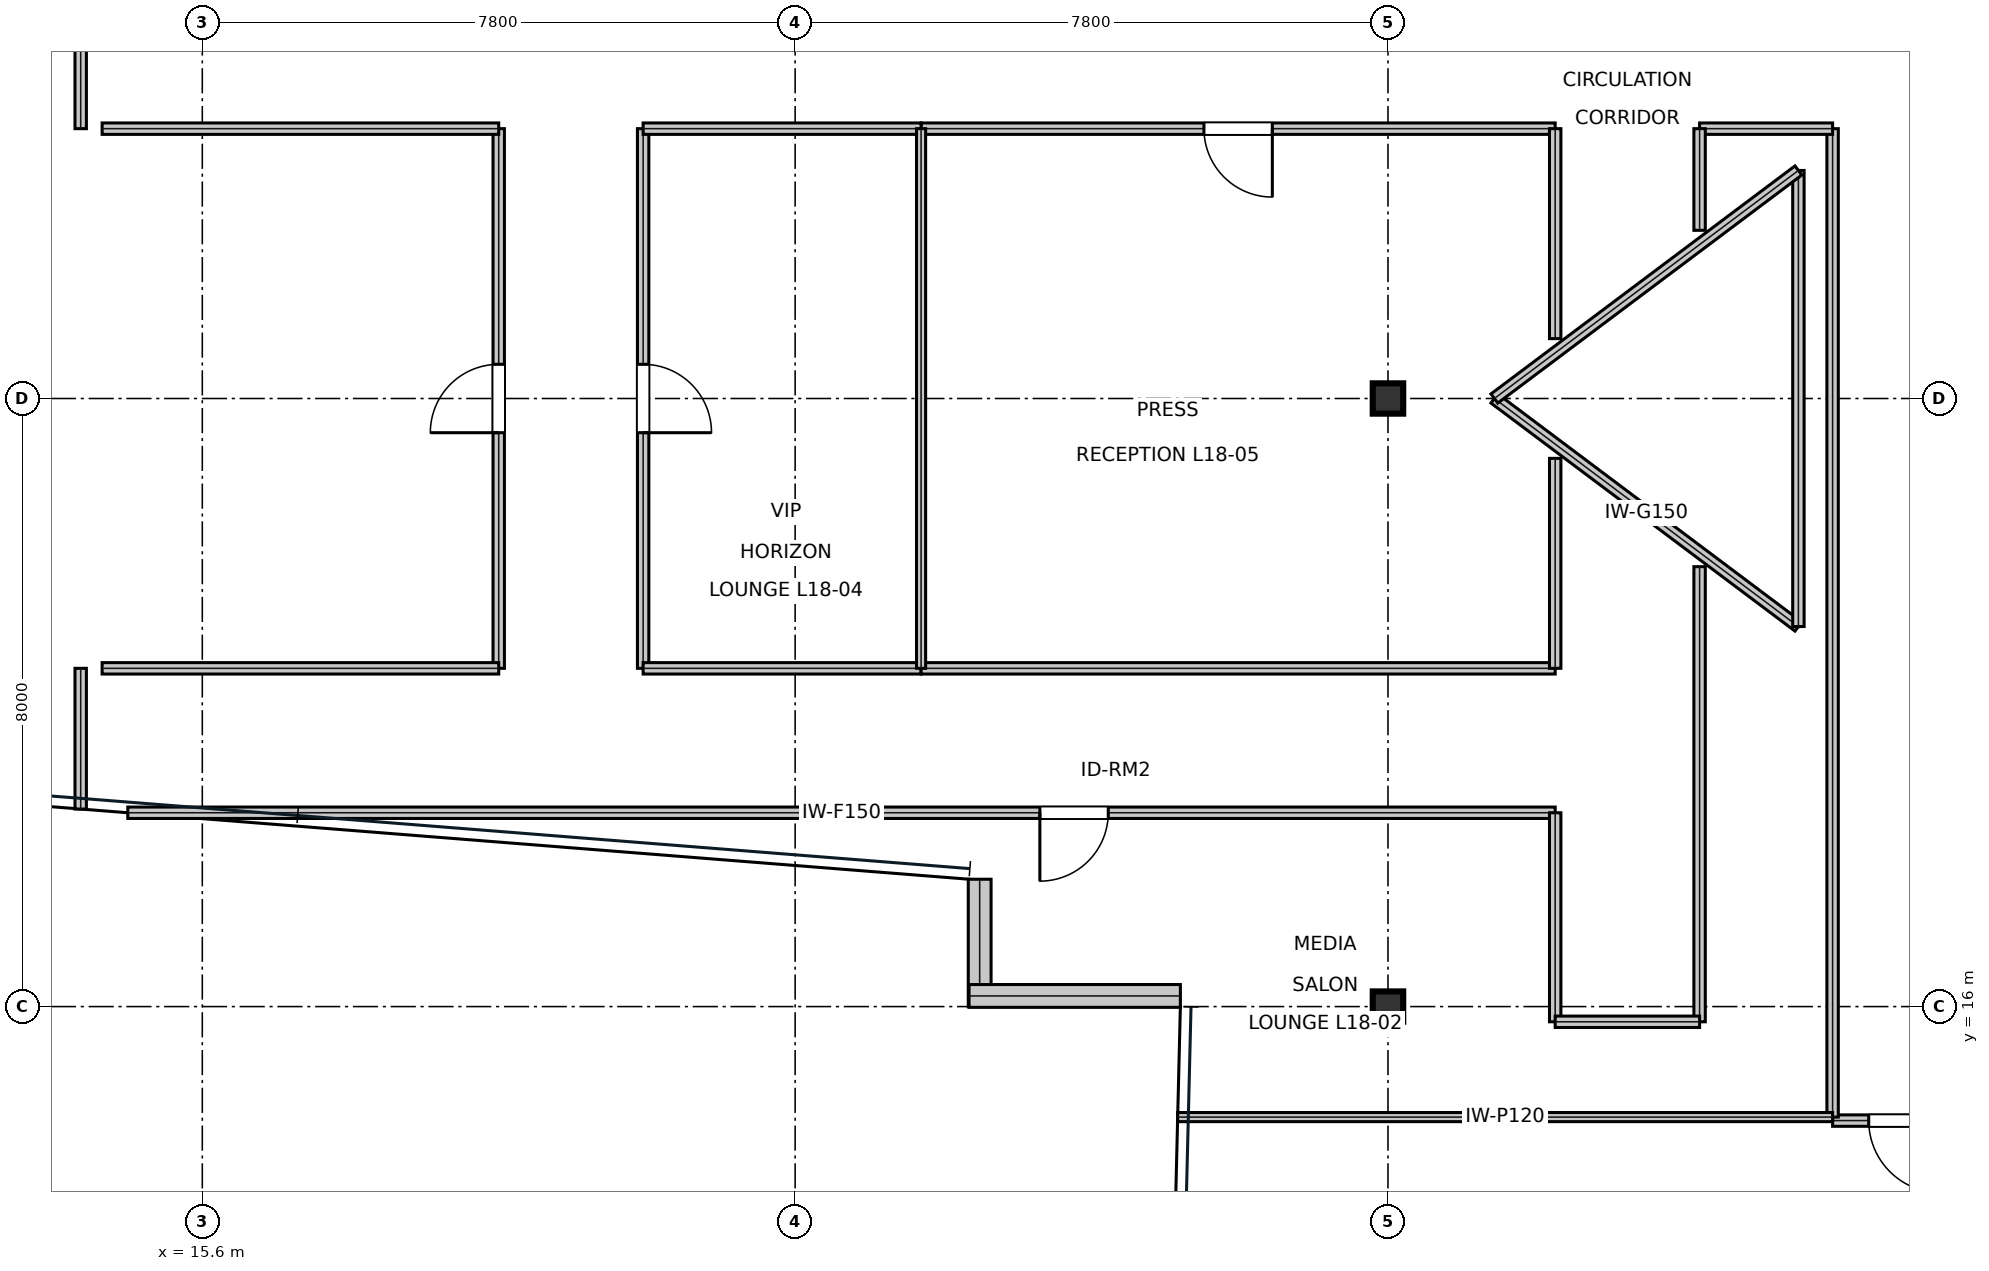
"""IFC4 building model, lengths in metres.
Left out: names, types, materials, properties, quantities, classifications, styles, units other than length and angle.
Written with IfcOpenShell. Run it as: python <this file> out.ifc"""

import sys

from ifc_helpers import new_model, si_unit, direction, frame, frame_2d, origin, origin_2d, place, context, subcontext, project, spatial, rectangle, i_section, extrude, element, fill, save


model = new_model("IFC4")
c1 = context("Model", 3, precision=1e-05, world=origin(), true_north=direction((0.0, 1.0)))
c2 = subcontext(c1, "Body", "Model", "MODEL_VIEW")
j1 = project(units=[si_unit("LENGTHUNIT", "METRE"), si_unit("PLANEANGLEUNIT", "RADIAN")], contexts=[c1])
p1 = place(None, origin())
s1 = spatial("IfcSite", under=j1, at=p1, CompositionType="ELEMENT")
p2 = place(p1, origin())
s2 = spatial("IfcBuilding", under=s1, at=p2, CompositionType="ELEMENT")
p3 = place(p2, frame((0.0, 0.0, 82.35)))
s3 = spatial("IfcBuildingStorey", under=s2, at=p3, CompositionType="ELEMENT", Elevation=82.35)
for number, where, z_axis, x_axis in (
    (1, (31.2, 16.0, 0.0), (0.0, 0.0, 1.0), (1.0, 0.0, 0.0)),
    (2, (31.2, 24.0, 0.0), (0.0, 0.0, 1.0), (1.0, 0.0, 0.0)),
):
    element("IfcColumn", number, at=place(p3, frame(where, z_axis=z_axis, x_axis=x_axis)), inside=s3, PredefinedType="COLUMN", context=c2, shape_type="SweptSolid", body=[
        extrude(i_section(OverallWidth=0.401, OverallDepth=0.399, WebThickness=0.025, FlangeThickness=0.04, at=origin_2d()), origin(), (0.0, 0.0, 1.0), 4.044),
    ])
p4 = place(p3, frame((25.828, 17.675, 0.0), z_axis=(0.0, 0.0, 1.0), x_axis=(0.0, -1.0, 0.0)))
e3 = element("IfcWall", 3, at=p4, inside=s3, PredefinedType="STANDARD", context=c2, shape_type="SweptSolid", body=[
    extrude(rectangle(XDim=1.675, YDim=0.3, at=frame_2d((0.838, 0.0))), origin(), (0.0, 0.0, 1.0), 3.338),
])
p5 = place(p3, frame((25.688, 16.14, 0.0), z_axis=(0.0, 0.0, 1.0), x_axis=(1.0, 0.0, 0.0)))
e4 = element("IfcWall", 4, at=p5, inside=s3, PredefinedType="STANDARD", context=c2, shape_type="SweptSolid", body=[
    extrude(rectangle(XDim=2.781, YDim=0.3, at=frame_2d((1.39, 0.0))), origin(), (0.0, 0.0, 1.0), 3.81),
])
p6 = place(p3, frame((37.05, 14.5, 0.0), z_axis=(0.0, 0.0, 1.0), x_axis=(1.0, 0.0, 0.0)))
e5 = element("IfcWall", 5, at=p6, inside=s3, PredefinedType="PARTITIONING", context=c2, shape_type="SweptSolid", body=[
    extrude(rectangle(XDim=1.9, YDim=0.15, at=frame_2d((0.95, 0.0))), origin(), (0.0, 0.0, 1.0), 3.181),
])
p7 = place(p6, frame((0.475, 0.0, 0.0)))
e6 = element("IfcOpeningElement", 6, at=p7, cuts=e5, PredefinedType="OPENING", context=c2, shape_type="SweptSolid", body=[
    extrude(rectangle(XDim=0.95, YDim=2.15, at=frame_2d((0.475, 1.075))), frame((0.0, 0.085, 0.0), z_axis=(0.0, -1.0, 0.0), x_axis=(1.0, 0.0, 0.0)), (0.0, 0.0, 1.0), 0.17),
])
p8 = place(p3, frame((14.62, 18.55, 0.0), z_axis=(0.0, 0.0, 1.0), x_axis=(1.0, 0.0, 0.0)))
e7 = element("IfcWall", 7, at=p8, inside=s3, PredefinedType="PARTITIONING", context=c2, shape_type="SweptSolid", body=[
    extrude(rectangle(XDim=18.78, YDim=0.15, at=frame_2d((9.39, 0.0))), origin(), (0.0, 0.0, 1.0), 3.181),
])
p9 = place(p8, frame((12.0, 0.0, 0.0)))
e8 = element("IfcOpeningElement", 8, at=p9, cuts=e7, PredefinedType="OPENING", context=c2, shape_type="SweptSolid", body=[
    extrude(rectangle(XDim=0.9, YDim=2.15, at=frame_2d((0.45, 1.075))), frame((0.0, 0.085, 0.0), z_axis=(0.0, -1.0, 0.0), x_axis=(1.0, 0.0, 0.0)), (0.0, 0.0, 1.0), 0.17),
])
p10 = place(p3, frame((19.5, 20.45, 0.0), z_axis=(0.0, 0.0, 1.0), x_axis=(0.0, 1.0, 0.0)))
e9 = element("IfcWall", 9, at=p10, inside=s3, PredefinedType="PARTITIONING", context=c2, shape_type="SweptSolid", body=[
    extrude(rectangle(XDim=7.1, YDim=0.15, at=frame_2d((3.55, 0.0))), origin(), (0.0, 0.0, 1.0), 3.181),
])
p11 = place(p10, frame((3.1, 0.0, 0.0)))
e10 = element("IfcOpeningElement", 10, at=p11, cuts=e9, PredefinedType="OPENING", context=c2, shape_type="SweptSolid", body=[
    extrude(rectangle(XDim=0.9, YDim=2.15, at=frame_2d((0.45, 1.075))), frame((0.0, 0.085, 0.0), z_axis=(0.0, -1.0, 0.0), x_axis=(1.0, 0.0, 0.0)), (0.0, 0.0, 1.0), 0.17),
])
p12 = place(p3, frame((21.4, 20.45, 0.0), z_axis=(0.0, 0.0, 1.0), x_axis=(0.0, 1.0, 0.0)))
e11 = element("IfcWall", 11, at=p12, inside=s3, PredefinedType="PARTITIONING", context=c2, shape_type="SweptSolid", body=[
    extrude(rectangle(XDim=7.1, YDim=0.15, at=frame_2d((3.55, 0.0))), origin(), (0.0, 0.0, 1.0), 3.181),
])
p13 = place(p12, frame((3.1, 0.0, 0.0)))
e12 = element("IfcOpeningElement", 12, at=p13, cuts=e11, PredefinedType="OPENING", context=c2, shape_type="SweptSolid", body=[
    extrude(rectangle(XDim=0.9, YDim=2.15, at=frame_2d((0.45, 1.075))), frame((0.0, 0.085, 0.0), z_axis=(0.0, -1.0, 0.0), x_axis=(1.0, 0.0, 0.0)), (0.0, 0.0, 1.0), 0.17),
])
p14 = place(p3, frame((25.057, 27.55, 0.0), z_axis=(0.0, 0.0, 1.0), x_axis=(1.0, 0.0, 0.0)))
e13 = element("IfcWall", 13, at=p14, inside=s3, PredefinedType="PARTITIONING", context=c2, shape_type="SweptSolid", body=[
    extrude(rectangle(XDim=8.343, YDim=0.15, at=frame_2d((4.171, 0.0))), origin(), (0.0, 0.0, 1.0), 3.181),
])
p15 = place(p14, frame((3.721, 0.0, 0.0)))
e14 = element("IfcOpeningElement", 14, at=p15, cuts=e13, PredefinedType="OPENING", context=c2, shape_type="SweptSolid", body=[
    extrude(rectangle(XDim=0.9, YDim=2.15, at=frame_2d((0.45, 1.075))), frame((0.0, 0.085, 0.0), z_axis=(0.0, -1.0, 0.0), x_axis=(1.0, 0.0, 0.0)), (0.0, 0.0, 1.0), 0.17),
])
p16 = place(p3, frame((37.05, 14.546, 0.0), z_axis=(0.0, 0.0, 1.0), x_axis=(0.0, 1.0, 0.0)))
e15 = element("IfcWall", 15, at=p16, inside=s3, PredefinedType="PARTITIONING", context=c2, shape_type="SweptSolid", body=[
    extrude(rectangle(XDim=13.004, YDim=0.15, at=frame_2d((6.502, 0.0))), origin(), (0.0, 0.0, 1.0), 3.181),
])
p17 = place(p3, frame((35.3, 15.8, 0.0), z_axis=(0.0, 0.0, 1.0), x_axis=(0.0, 1.0, 0.0)))
e16 = element("IfcWall", 16, at=p17, inside=s3, PredefinedType="PARTITIONING", context=c2, shape_type="SweptSolid", body=[
    extrude(rectangle(XDim=5.988, YDim=0.15, at=frame_2d((2.994, 0.0))), origin(), (0.0, 0.0, 1.0), 3.181),
])
p18 = place(p3, frame((33.4, 15.8, 0.0), z_axis=(0.0, 0.0, 1.0), x_axis=(0.0, 1.0, 0.0)))
e17 = element("IfcWall", 17, at=p18, inside=s3, PredefinedType="PARTITIONING", context=c2, shape_type="SweptSolid", body=[
    extrude(rectangle(XDim=2.75, YDim=0.15, at=frame_2d((1.375, 0.0))), origin(), (0.0, 0.0, 1.0), 3.181),
])
p19 = place(p3, frame((33.4, 15.8, 0.0), z_axis=(0.0, 0.0, 1.0), x_axis=(1.0, 0.0, 0.0)))
e18 = element("IfcWall", 18, at=p19, inside=s3, PredefinedType="PARTITIONING", context=c2, shape_type="SweptSolid", body=[
    extrude(rectangle(XDim=1.9, YDim=0.15, at=frame_2d((0.95, 0.0))), origin(), (0.0, 0.0, 1.0), 3.181),
])
p20 = place(p3, frame((35.3, 27.55, 0.0), z_axis=(0.0, 0.0, 1.0), x_axis=(1.0, 0.0, 0.0)))
e19 = element("IfcWall", 19, at=p20, inside=s3, PredefinedType="PARTITIONING", context=c2, shape_type="SweptSolid", body=[
    extrude(rectangle(XDim=1.75, YDim=0.15, at=frame_2d((0.875, 0.0))), origin(), (0.0, 0.0, 1.0), 3.391),
])
p21 = place(p3, frame((35.3, 26.212, 0.0), z_axis=(0.0, 0.0, 1.0), x_axis=(0.0, 1.0, 0.0)))
e20 = element("IfcWall", 20, at=p21, inside=s3, PredefinedType="PARTITIONING", context=c2, shape_type="SweptSolid", body=[
    extrude(rectangle(XDim=1.338, YDim=0.15, at=frame_2d((0.669, 0.0))), origin(), (0.0, 0.0, 1.0), 3.81),
])
for number, where, z_axis, x_axis in (
    (21, (14.282, 20.45, 0.0), (0.0, 0.0, 1.0), (1.0, 0.0, 0.0)),
    (22, (14.282, 27.55, 0.0), (0.0, 0.0, 1.0), (1.0, 0.0, 0.0)),
):
    element("IfcWall", number, at=place(p3, frame(where, z_axis=z_axis, x_axis=x_axis)), inside=s3, PredefinedType="PARTITIONING", context=c2, shape_type="SweptSolid", body=[
        extrude(rectangle(XDim=5.218, YDim=0.15, at=frame_2d((2.609, 0.0))), origin(), (0.0, 0.0, 1.0), 3.391),
    ])
for number, where, z_axis, x_axis in (
    (23, (14.0, 18.599, 0.0), (0.0, 0.0, 1.0), (0.0, 1.0, 0.0)),
    (24, (14.0, 27.55, 0.0), (0.0, 0.0, 1.0), (0.0, 1.0, 0.0)),
):
    element("IfcWall", number, at=place(p3, frame(where, z_axis=z_axis, x_axis=x_axis)), inside=s3, PredefinedType="PARTITIONING", context=c2, shape_type="SweptSolid", body=[
        extrude(rectangle(XDim=1.851, YDim=0.15, at=frame_2d((0.925, 0.0))), origin(), (0.0, 0.0, 1.0), 3.338),
    ])
p22 = place(p3, frame((21.4, 27.55, 0.0), z_axis=(0.0, 0.0, 1.0), x_axis=(1.0, 0.0, 0.0)))
e25 = element("IfcWall", 25, at=p22, inside=s3, PredefinedType="PARTITIONING", context=c2, shape_type="SweptSolid", body=[
    extrude(rectangle(XDim=3.657, YDim=0.15, at=frame_2d((1.829, 0.0))), origin(), (0.0, 0.0, 1.0), 3.81),
])
p23 = place(p3, frame((21.4, 20.45, 0.0), z_axis=(0.0, 0.0, 1.0), x_axis=(1.0, 0.0, 0.0)))
e26 = element("IfcWall", 26, at=p23, inside=s3, PredefinedType="PARTITIONING", context=c2, shape_type="SweptSolid", body=[
    extrude(rectangle(XDim=3.657, YDim=0.15, at=frame_2d((1.829, 0.0))), origin(), (0.0, 0.0, 1.0), 3.391),
])
p24 = place(p3, frame((25.057, 20.45, 0.0), z_axis=(0.0, 0.0, 1.0), x_axis=(1.0, 0.0, 0.0)))
e27 = element("IfcWall", 27, at=p24, inside=s3, PredefinedType="PARTITIONING", context=c2, shape_type="SweptSolid", body=[
    extrude(rectangle(XDim=8.343, YDim=0.15, at=frame_2d((4.171, 0.0))), origin(), (0.0, 0.0, 1.0), 3.181),
])
for number, where, z_axis, x_axis in (
    (28, (33.4, 24.788, 0.0), (0.0, 0.0, 1.0), (0.0, 1.0, 0.0)),
    (29, (33.4, 20.45, 0.0), (0.0, 0.0, 1.0), (0.0, 1.0, 0.0)),
):
    element("IfcWall", number, at=place(p3, frame(where, z_axis=z_axis, x_axis=x_axis)), inside=s3, PredefinedType="PARTITIONING", context=c2, shape_type="SweptSolid", body=[
        extrude(rectangle(XDim=2.762, YDim=0.15, at=frame_2d((1.381, 0.0))), origin(), (0.0, 0.0, 1.0), 3.81),
    ])
p25 = place(p3, frame((28.433, 14.546, 0.0), z_axis=(0.0, 0.0, 1.0), x_axis=(1.0, 0.0, 0.0)))
e30 = element("IfcWall", 30, at=p25, inside=s3, PredefinedType="PARTITIONING", context=c2, shape_type="SweptSolid", body=[
    extrude(rectangle(XDim=8.617, YDim=0.12, at=frame_2d((4.309, 0.0))), origin(), (0.0, 0.0, 1.0), 3.338),
])
p26 = place(p3, frame((25.057, 20.45, 0.0), z_axis=(0.0, 0.0, 1.0), x_axis=(0.0, 1.0, 0.0)))
e31 = element("IfcWall", 31, at=p26, inside=s3, PredefinedType="PARTITIONING", context=c2, shape_type="SweptSolid", body=[
    extrude(rectangle(XDim=7.1, YDim=0.12, at=frame_2d((3.55, 0.0))), origin(), (0.0, 0.0, 1.0), 3.181),
])
p27 = place(p3, frame((32.6, 24.0, 0.0), z_axis=(0.0, 0.0, 1.0), x_axis=(0.8, -0.6, 0.0)))
e32 = element("IfcWall", 32, at=p27, inside=s3, PredefinedType="MOVABLE", context=c2, shape_type="SweptSolid", body=[
    extrude(rectangle(XDim=5.0, YDim=0.15, at=frame_2d((2.5, 0.0))), origin(), (0.0, 0.0, 1.0), 3.81),
])
p28 = place(p3, frame((36.6, 21.0, 0.0), z_axis=(0.0, 0.0, 1.0), x_axis=(0.0, 1.0, 0.0)))
e33 = element("IfcWall", 33, at=p28, inside=s3, PredefinedType="MOVABLE", context=c2, shape_type="SweptSolid", body=[
    extrude(rectangle(XDim=6.0, YDim=0.15, at=frame_2d((3.0, 0.0))), origin(), (0.0, 0.0, 1.0), 3.81),
])
p29 = place(p3, frame((36.6, 27.0, 0.0), z_axis=(0.0, 0.0, 1.0), x_axis=(-0.8, -0.6, 0.0)))
e34 = element("IfcWall", 34, at=p29, inside=s3, PredefinedType="MOVABLE", context=c2, shape_type="SweptSolid", body=[
    extrude(rectangle(XDim=5.0, YDim=0.15, at=frame_2d((2.5, 0.0))), origin(), (0.0, 0.0, 1.0), 3.81),
])
p30 = place(p7, frame((0.95, 0.0, 0.0), z_axis=(0.0, 0.0, 1.0), x_axis=(-1.0, 0.0, 0.0)))
e35 = element("IfcDoor", 35, at=p30, inside=s3, OperationType="SINGLE_SWING_LEFT", PredefinedType="DOOR", context=c2, shape_type="SweptSolid", body=[
    extrude(rectangle(XDim=0.95, YDim=2.15, at=frame_2d((0.475, 1.075))), frame((0.0, 0.025, 0.0), z_axis=(0.0, -1.0, 0.0), x_axis=(1.0, 0.0, 0.0)), (0.0, 0.0, 1.0), 0.05),
])
fill(e6, e35)
p31 = place(p9, frame((0.9, 0.0, 0.0), z_axis=(0.0, 0.0, 1.0), x_axis=(-1.0, 0.0, 0.0)))
e36 = element("IfcDoor", 36, at=p31, inside=s3, OperationType="SINGLE_SWING_RIGHT", PredefinedType="DOOR", context=c2, shape_type="SweptSolid", body=[
    extrude(rectangle(XDim=0.9, YDim=2.15, at=frame_2d((0.45, 1.075))), frame((0.0, 0.025, 0.0), z_axis=(0.0, -1.0, 0.0), x_axis=(1.0, 0.0, 0.0)), (0.0, 0.0, 1.0), 0.05),
])
fill(e8, e36)
p32 = place(p11, origin())
e37 = element("IfcDoor", 37, at=p32, inside=s3, OperationType="SINGLE_SWING_LEFT", PredefinedType="DOOR", context=c2, shape_type="SweptSolid", body=[
    extrude(rectangle(XDim=0.9, YDim=2.15, at=frame_2d((0.45, 1.075))), frame((0.0, 0.025, 0.0), z_axis=(0.0, -1.0, 0.0), x_axis=(1.0, 0.0, 0.0)), (0.0, 0.0, 1.0), 0.05),
])
fill(e10, e37)
p33 = place(p13, frame((0.9, 0.0, 0.0), z_axis=(0.0, 0.0, 1.0), x_axis=(-1.0, 0.0, 0.0)))
e38 = element("IfcDoor", 38, at=p33, inside=s3, OperationType="SINGLE_SWING_RIGHT", PredefinedType="DOOR", context=c2, shape_type="SweptSolid", body=[
    extrude(rectangle(XDim=0.9, YDim=2.15, at=frame_2d((0.45, 1.075))), frame((0.0, 0.025, 0.0), z_axis=(0.0, -1.0, 0.0), x_axis=(1.0, 0.0, 0.0)), (0.0, 0.0, 1.0), 0.05),
])
fill(e12, e38)
p34 = place(p15, frame((0.9, 0.0, 0.0), z_axis=(0.0, 0.0, 1.0), x_axis=(-1.0, 0.0, 0.0)))
e39 = element("IfcDoor", 39, at=p34, inside=s3, OperationType="SINGLE_SWING_LEFT", PredefinedType="DOOR", context=c2, shape_type="SweptSolid", body=[
    extrude(rectangle(XDim=0.9, YDim=2.15, at=frame_2d((0.45, 1.075))), frame((0.0, 0.025, 0.0), z_axis=(0.0, -1.0, 0.0), x_axis=(1.0, 0.0, 0.0)), (0.0, 0.0, 1.0), 0.05),
])
fill(e14, e39)
save(model, sys.argv[1])
